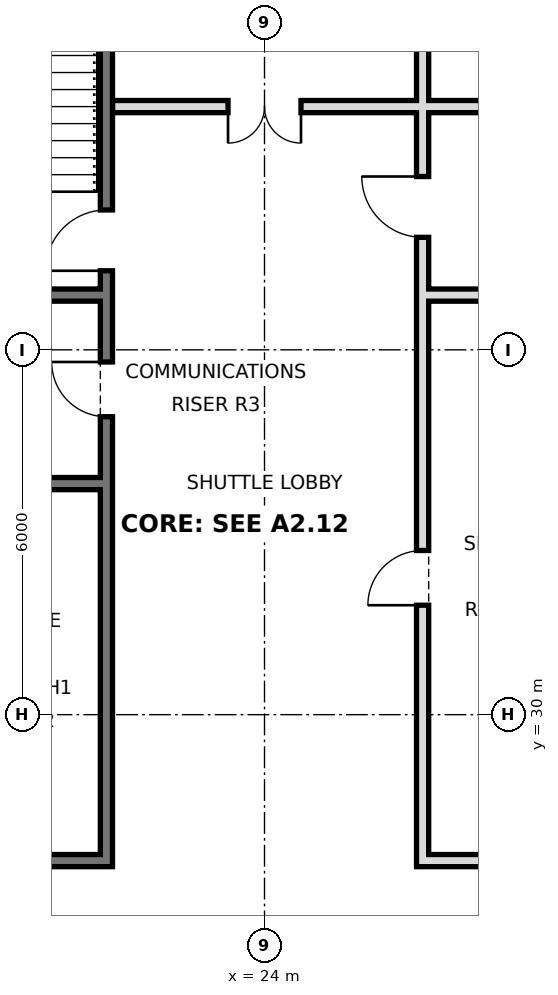
"""IFC4 building model, lengths in metres.
Left out: names, types, materials, properties, quantities, classifications, styles, units other than length and angle.
Written with IfcOpenShell. Run it as: python <this file> out.ifc"""

import sys

from ifc_helpers import new_model, si_unit, direction, frame, frame_2d, origin, place, context, subcontext, project, spatial, rectangle, extrude, element, fill, save


model = new_model("IFC4")
c1 = context("Model", 3, precision=1e-05, world=origin(), true_north=direction((0.0, 1.0)))
c2 = subcontext(c1, "Body", "Model", "MODEL_VIEW")
j1 = project(units=[si_unit("LENGTHUNIT", "METRE"), si_unit("PLANEANGLEUNIT", "RADIAN")], contexts=[c1])
p1 = place(None, origin())
s1 = spatial("IfcSite", under=j1, at=p1, CompositionType="ELEMENT")
p2 = place(p1, origin())
s2 = spatial("IfcBuilding", under=s1, at=p2, CompositionType="ELEMENT")
p3 = place(p2, frame((0.0, 0.0, 49.8)))
s3 = spatial("IfcBuildingStorey", under=s2, at=p3, CompositionType="ELEMENT", Elevation=49.8)
p4 = place(p3, frame((21.4, 27.5, 0.0), z_axis=(0.0, 0.0, 1.0), x_axis=(0.0, 1.0, 0.0)))
e1 = element("IfcWall", 1, at=p4, inside=s3, PredefinedType="SOLIDWALL", context=c2, shape_type="SweptSolid", body=[
    extrude(rectangle(XDim=17.5, YDim=0.2, at=frame_2d((8.75, 0.0))), origin(), (0.0, 0.0, 1.0), 3.42),
])
p5 = place(p4, frame((9.8, 0.0, 0.0)))
e2 = element("IfcOpeningElement", 2, at=p5, cuts=e1, PredefinedType="OPENING", context=c2, shape_type="SweptSolid", body=[
    extrude(rectangle(XDim=1.0, YDim=2.1, at=frame_2d((0.5, 1.05))), frame((0.0, 0.11, 0.0), z_axis=(0.0, -1.0, 0.0), x_axis=(1.0, 0.0, 0.0)), (0.0, 0.0, 1.0), 0.22),
])
p6 = place(p4, frame((7.4, 0.0, 0.0)))
e3 = element("IfcOpeningElement", 3, at=p6, cuts=e1, PredefinedType="OPENING", context=c2, shape_type="SweptSolid", body=[
    extrude(rectangle(XDim=0.9, YDim=2.1, at=frame_2d((0.45, 1.05))), frame((0.0, 0.11, 0.0), z_axis=(0.0, -1.0, 0.0), x_axis=(1.0, 0.0, 0.0)), (0.0, 0.0, 1.0), 0.22),
])
p7 = place(p3, frame((26.6, 27.5, 0.0), z_axis=(0.0, 0.0, 1.0), x_axis=(0.0, 1.0, 0.0)))
e4 = element("IfcWall", 4, at=p7, inside=s3, PredefinedType="SOLIDWALL", context=c2, shape_type="SweptSolid", body=[
    extrude(rectangle(XDim=17.5, YDim=0.2, at=frame_2d((8.75, 0.0))), origin(), (0.0, 0.0, 1.0), 3.42),
])
p8 = place(p7, frame((4.3, 0.0, 0.0)))
e5 = element("IfcOpeningElement", 5, at=p8, cuts=e4, PredefinedType="OPENING", context=c2, shape_type="SweptSolid", body=[
    extrude(rectangle(XDim=0.9, YDim=2.1, at=frame_2d((0.45, 1.05))), frame((0.0, 0.11, 0.0), z_axis=(0.0, -1.0, 0.0), x_axis=(1.0, 0.0, 0.0)), (0.0, 0.0, 1.0), 0.22),
])
p9 = place(p7, frame((10.35, 0.0, 0.0)))
e6 = element("IfcOpeningElement", 6, at=p9, cuts=e4, PredefinedType="OPENING", context=c2, shape_type="SweptSolid", body=[
    extrude(rectangle(XDim=1.0, YDim=2.1, at=frame_2d((0.5, 1.05))), frame((0.0, 0.11, 0.0), z_axis=(0.0, -1.0, 0.0), x_axis=(1.0, 0.0, 0.0)), (0.0, 0.0, 1.0), 0.22),
])
p10 = place(p7, frame((14.575, 0.0, 0.0)))
e7 = element("IfcOpeningElement", 7, at=p10, cuts=e4, PredefinedType="OPENING", context=c2, shape_type="SweptSolid", body=[
    extrude(rectangle(XDim=1.0, YDim=2.1, at=frame_2d((0.5, 1.05))), frame((0.0, 0.11, 0.0), z_axis=(0.0, -1.0, 0.0), x_axis=(1.0, 0.0, 0.0)), (0.0, 0.0, 1.0), 0.22),
])
for number, where, z_axis, x_axis in (
    (8, (18.6, 27.6, 0.0), (0.0, 0.0, 1.0), (1.0, 0.0, 0.0)),
    (9, (26.7, 27.6, 0.0), (0.0, 0.0, 1.0), (1.0, 0.0, 0.0)),
    (10, (18.6, 33.8, 0.0), (0.0, 0.0, 1.0), (1.0, 0.0, 0.0)),
    (11, (18.6, 36.9, 0.0), (0.0, 0.0, 1.0), (1.0, 0.0, 0.0)),
    (12, (26.7, 36.9, 0.0), (0.0, 0.0, 1.0), (1.0, 0.0, 0.0)),
):
    element("IfcWall", number, at=place(p3, frame(where, z_axis=z_axis, x_axis=x_axis)), inside=s3, PredefinedType="SOLIDWALL", context=c2, shape_type="SweptSolid", body=[
        extrude(rectangle(XDim=2.7, YDim=0.2, at=frame_2d((1.35, 0.0))), origin(), (0.0, 0.0, 1.0), 3.42),
    ])
p11 = place(p3, frame((21.5, 40.0, 0.0), z_axis=(0.0, 0.0, 1.0), x_axis=(1.0, 0.0, 0.0)))
e13 = element("IfcWall", 13, at=p11, inside=s3, PredefinedType="PARTITIONING", context=c2, shape_type="SweptSolid", body=[
    extrude(rectangle(XDim=7.9, YDim=0.2, at=frame_2d((3.95, 0.0))), origin(), (0.0, 0.0, 1.0), 3.42),
])
p12 = place(p11, frame((1.9, 0.0, 0.0)))
e14 = element("IfcOpeningElement", 14, at=p12, cuts=e13, PredefinedType="OPENING", context=c2, shape_type="SweptSolid", body=[
    extrude(rectangle(XDim=1.2, YDim=2.1, at=frame_2d((0.6, 1.05))), frame((0.0, 0.11, 0.0), z_axis=(0.0, -1.0, 0.0), x_axis=(1.0, 0.0, 0.0)), (0.0, 0.0, 1.0), 0.22),
])
p13 = place(p12, frame((1.2, 0.0, 0.0), z_axis=(0.0, 0.0, 1.0), x_axis=(-1.0, 0.0, 0.0)))
e15 = element("IfcDoor", 15, at=p13, inside=s3, OperationType="DOUBLE_DOOR_SINGLE_SWING", PredefinedType="DOOR", context=c2, shape_type="SweptSolid", body=[
    extrude(rectangle(XDim=1.2, YDim=2.1, at=frame_2d((0.6, 1.05))), frame((0.0, 0.025, 0.0), z_axis=(0.0, -1.0, 0.0), x_axis=(1.0, 0.0, 0.0)), (0.0, 0.0, 1.0), 0.05),
])
fill(e14, e15)
p14 = place(p5, origin())
e16 = element("IfcDoor", 16, at=p14, inside=s3, OperationType="SINGLE_SWING_LEFT", PredefinedType="DOOR", context=c2, shape_type="SweptSolid", body=[
    extrude(rectangle(XDim=1.0, YDim=2.1, at=frame_2d((0.5, 1.05))), frame((0.0, 0.025, 0.0), z_axis=(0.0, -1.0, 0.0), x_axis=(1.0, 0.0, 0.0)), (0.0, 0.0, 1.0), 0.05),
])
fill(e2, e16)
p15 = place(p6, frame((0.9, 0.0, 0.0), z_axis=(0.0, 0.0, 1.0), x_axis=(-1.0, 0.0, 0.0)))
e17 = element("IfcDoor", 17, at=p15, inside=s3, OperationType="SINGLE_SWING_LEFT", PredefinedType="DOOR", context=c2, shape_type="SweptSolid", body=[
    extrude(rectangle(XDim=0.9, YDim=2.1, at=frame_2d((0.45, 1.05))), frame((0.0, 0.025, 0.0), z_axis=(0.0, -1.0, 0.0), x_axis=(1.0, 0.0, 0.0)), (0.0, 0.0, 1.0), 0.05),
])
fill(e3, e17)
p16 = place(p8, origin())
e18 = element("IfcDoor", 18, at=p16, inside=s3, OperationType="SINGLE_SWING_LEFT", PredefinedType="DOOR", context=c2, shape_type="SweptSolid", body=[
    extrude(rectangle(XDim=0.9, YDim=2.1, at=frame_2d((0.45, 1.05))), frame((0.0, 0.025, 0.0), z_axis=(0.0, -1.0, 0.0), x_axis=(1.0, 0.0, 0.0)), (0.0, 0.0, 1.0), 0.05),
])
fill(e5, e18)
p17 = place(p9, frame((1.0, 0.0, 0.0), z_axis=(0.0, 0.0, 1.0), x_axis=(-1.0, 0.0, 0.0)))
e19 = element("IfcDoor", 19, at=p17, inside=s3, OperationType="SINGLE_SWING_LEFT", PredefinedType="DOOR", context=c2, shape_type="SweptSolid", body=[
    extrude(rectangle(XDim=1.0, YDim=2.1, at=frame_2d((0.5, 1.05))), frame((0.0, 0.025, 0.0), z_axis=(0.0, -1.0, 0.0), x_axis=(1.0, 0.0, 0.0)), (0.0, 0.0, 1.0), 0.05),
])
fill(e6, e19)
save(model, sys.argv[1])
